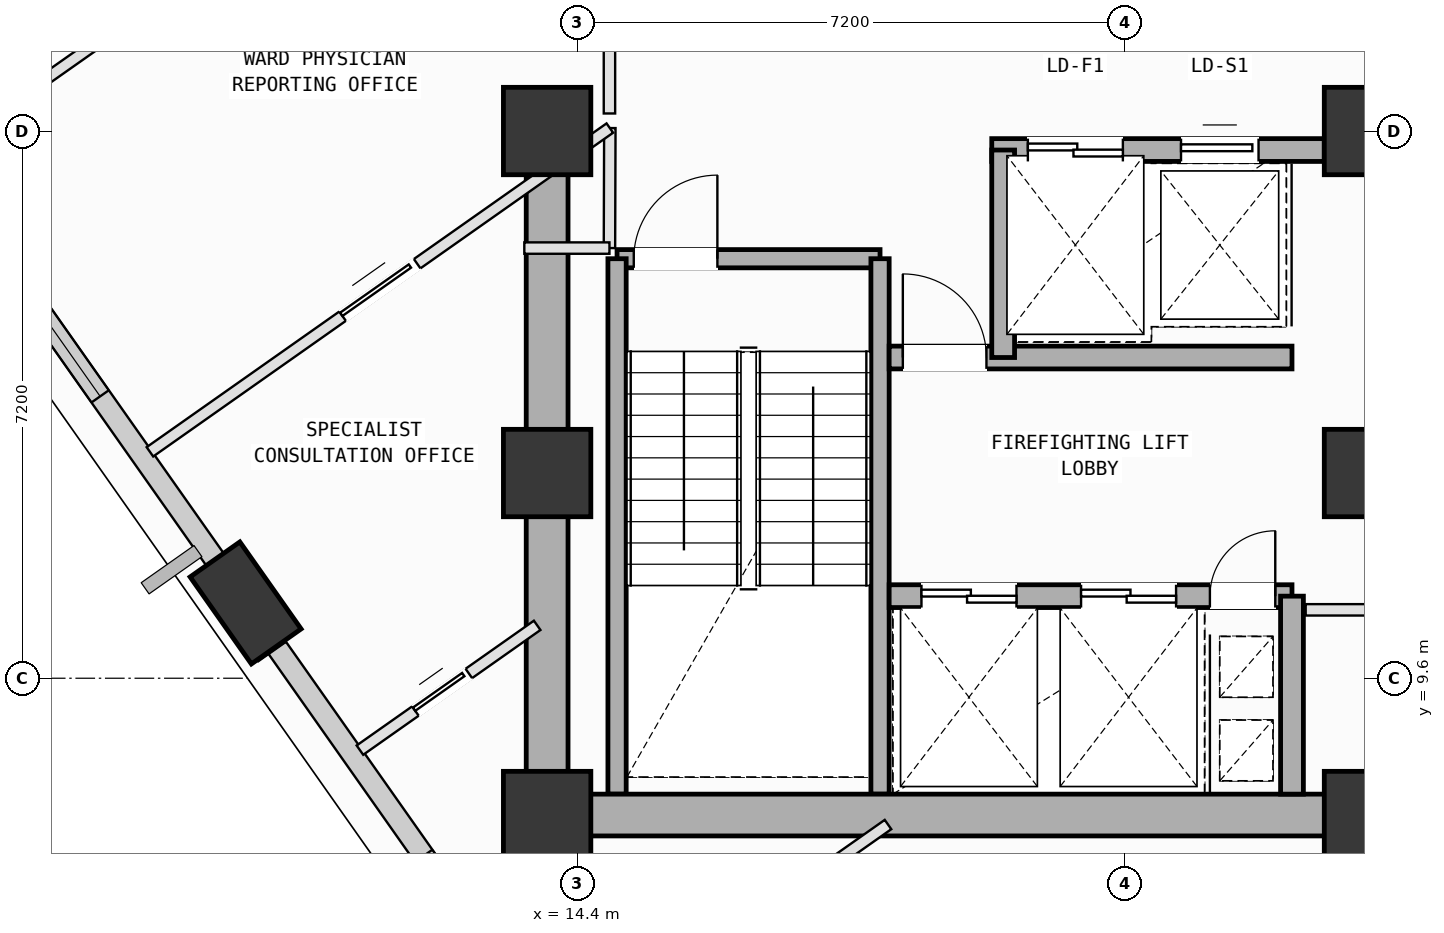
"""IFC4 building model, lengths in metres.
Left out: names, types, materials, properties, quantities, classifications, styles, units other than length and angle.
Written with IfcOpenShell. Run it as: python <this file> out.ifc"""

import sys

from ifc_helpers import new_model, si_unit, direction, frame, frame_2d, origin, origin_2d, place, context, subcontext, project, spatial, rectangle, extrude, element, fill, save


model = new_model("IFC4")
c1 = context("Model", 3, precision=1e-05, world=origin(), true_north=direction((0.0, 1.0)))
c2 = subcontext(c1, "Body", "Model", "MODEL_VIEW")
j1 = project(units=[si_unit("LENGTHUNIT", "METRE"), si_unit("PLANEANGLEUNIT", "RADIAN")], contexts=[c1])
p1 = place(None, origin())
s1 = spatial("IfcSite", under=j1, at=p1, CompositionType="ELEMENT")
p2 = place(p1, origin())
s2 = spatial("IfcBuilding", under=s1, at=p2, CompositionType="ELEMENT")
p3 = place(p2, frame((0.0, 0.0, 173.8)))
s3 = spatial("IfcBuildingStorey", under=s2, at=p3, CompositionType="ELEMENT", Elevation=173.8)
for number, where, z_axis, x_axis in (
    (1, (14.0, 7.8, 0.0), (0.0, 0.0, 1.0), (1.0, 0.0, 0.0)),
    (2, (14.0, 12.3, 0.0), (0.0, 0.0, 1.0), (1.0, 0.0, 0.0)),
    (3, (14.0, 16.8, 0.0), (0.0, 0.0, 1.0), (1.0, 0.0, 0.0)),
    (4, (24.8, 7.8, 0.0), (0.0, 0.0, 1.0), (1.0, 0.0, 0.0)),
    (5, (24.8, 12.3, 0.0), (0.0, 0.0, 1.0), (1.0, 0.0, 0.0)),
    (6, (24.8, 16.8, 0.0), (0.0, 0.0, 1.0), (1.0, 0.0, 0.0)),
):
    element("IfcColumn", number, at=place(p3, frame(where, z_axis=z_axis, x_axis=x_axis)), inside=s3, PredefinedType="COLUMN", context=c2, shape_type="SweptSolid", body=[
        extrude(rectangle(XDim=1.15, YDim=1.15, at=origin_2d()), origin(), (0.0, 0.0, 1.0), 4.0),
    ])
p4 = place(p3, frame((10.033, 10.591, 0.002), z_axis=(0.059361981689, -0.096569440559, 0.993554476755), x_axis=(-0.915889100043, 0.390585013166, 0.092684971335)))
e7 = element("IfcColumn", 7, at=p4, inside=s3, PredefinedType="COLUMN", context=c2, shape_type="SweptSolid", body=[
    extrude(rectangle(XDim=1.4, YDim=0.8, at=origin_2d()), origin(), (0.0, 0.0, 1.0), 4.022),
])
p5 = place(p3, frame((9.878, 10.81, 0.0), z_axis=(0.0, 0.0, 1.0), x_axis=(-0.575714474807, 0.817650807801, 0.0)))
e8 = element("IfcWall", 8, at=p5, inside=s3, PredefinedType="SOLIDWALL", context=c2, shape_type="SweptSolid", body=[
    extrude(rectangle(XDim=5.662, YDim=0.28, at=frame_2d((2.831, 0.0))), origin(), (0.0, 0.0, 1.0), 3.265),
])
p6 = place(p5, frame((3.056, 0.0, 0.75)))
e9 = element("IfcOpeningElement", 9, at=p6, cuts=e8, PredefinedType="OPENING", context=c2, shape_type="SweptSolid", body=[
    extrude(rectangle(XDim=2.0, YDim=1.95, at=frame_2d((1.0, 0.975))), frame((0.0, 0.15, 0.0), z_axis=(0.0, -1.0, 0.0), x_axis=(1.0, 0.0, 0.0)), (0.0, 0.0, 1.0), 0.3),
])
p7 = place(p3, frame((14.687, 3.981, 0.0), z_axis=(0.0, 0.0, 1.0), x_axis=(-0.575708660285, 0.817654901822, 0.0)))
e10 = element("IfcWall", 10, at=p7, inside=s3, PredefinedType="SOLIDWALL", context=c2, shape_type="SweptSolid", body=[
    extrude(rectangle(XDim=7.36, YDim=0.28, at=frame_2d((3.68, 0.0))), origin(), (0.0, 0.0, 1.0), 3.065),
])
p8 = place(p7, frame((2.614, 0.0, 0.75)))
e11 = element("IfcOpeningElement", 11, at=p8, cuts=e10, PredefinedType="OPENING", context=c2, shape_type="SweptSolid", body=[
    extrude(rectangle(XDim=1.4, YDim=1.85, at=frame_2d((0.7, 0.925))), frame((0.0, 0.15, 0.0), z_axis=(0.0, -1.0, 0.0), x_axis=(1.0, 0.0, 0.0)), (0.0, 0.0, 1.0), 0.3),
])
p9 = place(p3, frame((14.92, 15.12, 0.0), z_axis=(0.0, 0.0, 1.0), x_axis=(1.0, 0.0, 0.0)))
e12 = element("IfcWall", 12, at=p9, inside=s3, PredefinedType="SOLIDWALL", context=c2, shape_type="SweptSolid", body=[
    extrude(rectangle(XDim=3.46, YDim=0.24, at=frame_2d((1.73, 0.0))), origin(), (0.0, 0.0, 1.0), 3.78),
])
p10 = place(p9, frame((0.22, 0.0, 0.0)))
e13 = element("IfcOpeningElement", 13, at=p10, cuts=e12, PredefinedType="OPENING", context=c2, shape_type="SweptSolid", body=[
    extrude(rectangle(XDim=1.1, YDim=2.15, at=frame_2d((0.55, 1.075))), frame((0.0, 0.13, 0.0), z_axis=(0.0, -1.0, 0.0), x_axis=(1.0, 0.0, 0.0)), (0.0, 0.0, 1.0), 0.26),
])
for number, where, z_axis, x_axis in (
    (14, (18.38, 15.12, 0.0), (0.0, 0.0, 1.0), (0.0, -1.0, 0.0)),
    (15, (14.92, 8.075, 0.0), (0.0, 0.0, 1.0), (0.0, 1.0, 0.0)),
):
    element("IfcWall", number, at=place(p3, frame(where, z_axis=z_axis, x_axis=x_axis)), inside=s3, PredefinedType="SOLIDWALL", context=c2, shape_type="SweptSolid", body=[
        extrude(rectangle(XDim=7.045, YDim=0.24, at=frame_2d((3.522, 0.0))), origin(), (0.0, 0.0, 1.0), 3.78),
    ])
p11 = place(p3, frame((14.0, 7.8, 0.0), z_axis=(0.0, 0.0, 1.0), x_axis=(1.0, 0.0, 0.0)))
e16 = element("IfcWall", 16, at=p11, inside=s3, PredefinedType="SHEAR", context=c2, shape_type="SweptSolid", body=[
    extrude(rectangle(XDim=10.8, YDim=0.55, at=frame_2d((5.4, 0.0))), origin(), (0.0, 0.0, 1.0), 3.78),
])
p12 = place(p3, frame((14.0, 16.8, 0.0), z_axis=(0.0, 0.0, 1.0), x_axis=(0.0, -1.0, 0.0)))
e17 = element("IfcWall", 17, at=p12, inside=s3, PredefinedType="SHEAR", context=c2, shape_type="SweptSolid", body=[
    extrude(rectangle(XDim=9.0, YDim=0.55, at=frame_2d((4.5, 0.0))), origin(), (0.0, 0.0, 1.0), 3.78),
])
p13 = place(p3, frame((19.85, 16.55, 0.0), z_axis=(0.0, 0.0, 1.0), x_axis=(1.0, 0.0, 0.0)))
e18 = element("IfcWall", 18, at=p13, inside=s3, PredefinedType="SOLIDWALL", context=c2, shape_type="SweptSolid", body=[
    extrude(rectangle(XDim=4.375, YDim=0.3, at=frame_2d((2.188, 0.0))), origin(), (0.0, 0.0, 1.0), 3.78),
])
p14 = place(p13, frame((0.475, 0.0, 0.0)))
e19 = element("IfcOpeningElement", 19, at=p14, cuts=e18, PredefinedType="OPENING", context=c2, shape_type="SweptSolid", body=[
    extrude(rectangle(XDim=1.25, YDim=2.18, at=frame_2d((0.625, 1.09))), frame((0.0, 0.16, 0.0), z_axis=(0.0, -1.0, 0.0), x_axis=(1.0, 0.0, 0.0)), (0.0, 0.0, 1.0), 0.32),
])
p15 = place(p13, frame((2.49, 0.0, 0.0)))
e20 = element("IfcOpeningElement", 20, at=p15, cuts=e18, PredefinedType="OPENING", context=c2, shape_type="SweptSolid", body=[
    extrude(rectangle(XDim=1.02, YDim=2.12, at=frame_2d((0.51, 1.06))), frame((0.0, 0.16, 0.0), z_axis=(0.0, -1.0, 0.0), x_axis=(1.0, 0.0, 0.0)), (0.0, 0.0, 1.0), 0.32),
])
p16 = place(p3, frame((18.5, 10.68, 0.0), z_axis=(0.0, 0.0, 1.0), x_axis=(1.0, 0.0, 0.0)))
e21 = element("IfcWall", 21, at=p16, inside=s3, PredefinedType="SOLIDWALL", context=c2, shape_type="SweptSolid", body=[
    extrude(rectangle(XDim=5.3, YDim=0.3, at=frame_2d((2.65, 0.0))), origin(), (0.0, 0.0, 1.0), 3.78),
])
p17 = place(p16, frame((4.22, 0.0, 0.0)))
e22 = element("IfcOpeningElement", 22, at=p17, cuts=e21, PredefinedType="OPENING", context=c2, shape_type="SweptSolid", body=[
    extrude(rectangle(XDim=0.86, YDim=2.06, at=frame_2d((0.43, 1.03))), frame((0.0, 0.16, 0.0), z_axis=(0.0, -1.0, 0.0), x_axis=(1.0, 0.0, 0.0)), (0.0, 0.0, 1.0), 0.32),
])
p18 = place(p16, frame((0.425, 0.0, 0.0)))
e23 = element("IfcOpeningElement", 23, at=p18, cuts=e21, PredefinedType="OPENING", context=c2, shape_type="SweptSolid", body=[
    extrude(rectangle(XDim=1.25, YDim=2.18, at=frame_2d((0.625, 1.09))), frame((0.0, 0.16, 0.0), z_axis=(0.0, -1.0, 0.0), x_axis=(1.0, 0.0, 0.0)), (0.0, 0.0, 1.0), 0.32),
])
p19 = place(p16, frame((2.525, 0.0, 0.0)))
e24 = element("IfcOpeningElement", 24, at=p19, cuts=e21, PredefinedType="OPENING", context=c2, shape_type="SweptSolid", body=[
    extrude(rectangle(XDim=1.25, YDim=2.18, at=frame_2d((0.625, 1.09))), frame((0.0, 0.16, 0.0), z_axis=(0.0, -1.0, 0.0), x_axis=(1.0, 0.0, 0.0)), (0.0, 0.0, 1.0), 0.32),
])
p20 = place(p3, frame((18.5, 13.82, 0.0), z_axis=(0.0, 0.0, 1.0), x_axis=(1.0, 0.0, 0.0)))
e25 = element("IfcWall", 25, at=p20, inside=s3, PredefinedType="SOLIDWALL", context=c2, shape_type="SweptSolid", body=[
    extrude(rectangle(XDim=5.3, YDim=0.3, at=frame_2d((2.65, 0.0))), origin(), (0.0, 0.0, 1.0), 3.78),
])
p21 = place(p20, frame((0.18, 0.0, 0.0)))
e26 = element("IfcOpeningElement", 26, at=p21, cuts=e25, PredefinedType="OPENING", context=c2, shape_type="SweptSolid", body=[
    extrude(rectangle(XDim=1.1, YDim=2.15, at=frame_2d((0.55, 1.075))), frame((0.0, 0.16, 0.0), z_axis=(0.0, -1.0, 0.0), x_axis=(1.0, 0.0, 0.0)), (0.0, 0.0, 1.0), 0.32),
])
p22 = place(p3, frame((23.8, 8.075, 0.0), z_axis=(0.0, 0.0, 1.0), x_axis=(0.0, 1.0, 0.0)))
e27 = element("IfcWall", 27, at=p22, inside=s3, PredefinedType="SOLIDWALL", context=c2, shape_type="SweptSolid", body=[
    extrude(rectangle(XDim=2.605, YDim=0.3, at=frame_2d((1.302, 0.0))), origin(), (0.0, 0.0, 1.0), 3.78),
])
p23 = place(p3, frame((20.0, 13.82, 0.0), z_axis=(0.0, 0.0, 1.0), x_axis=(0.0, 1.0, 0.0)))
e28 = element("IfcWall", 28, at=p23, inside=s3, PredefinedType="SOLIDWALL", context=c2, shape_type="SweptSolid", body=[
    extrude(rectangle(XDim=2.73, YDim=0.3, at=frame_2d((1.365, 0.0))), origin(), (0.0, 0.0, 1.0), 3.78),
])
p24 = place(p3, frame((23.98, 10.5, 0.0), z_axis=(0.0, 0.0, 1.0), x_axis=(1.0, 0.0, 0.0)))
e29 = element("IfcWall", 29, at=p24, inside=s3, PredefinedType="PARTITIONING", context=c2, shape_type="SweptSolid", body=[
    extrude(rectangle(XDim=5.4, YDim=0.15, at=frame_2d((2.7, 0.0))), origin(), (0.0, 0.0, 1.0), 3.78),
])
p25 = place(p24, frame((3.703, 0.0, 0.0)))
e30 = element("IfcOpeningElement", 30, at=p25, cuts=e29, PredefinedType="OPENING", context=c2, shape_type="SweptSolid", body=[
    extrude(rectangle(XDim=0.86, YDim=2.06, at=frame_2d((0.43, 1.03))), frame((0.0, 0.085, 0.0), z_axis=(0.0, -1.0, 0.0), x_axis=(1.0, 0.0, 0.0)), (0.0, 0.0, 1.0), 0.17),
])
p26 = place(p3, frame((24.101, 5.636, 0.0), z_axis=(0.0, 0.0, 1.0), x_axis=(0.817472101836, 0.575968195928, 0.0)))
e31 = element("IfcWall", 31, at=p26, inside=s3, PredefinedType="PARTITIONING", context=c2, shape_type="SweptSolid", body=[
    extrude(rectangle(XDim=3.54, YDim=0.15, at=frame_2d((1.77, 0.0))), origin(), (0.0, 0.0, 1.0), 3.78),
])
p27 = place(p3, frame((14.301, 4.729, 0.0), z_axis=(0.0, 0.0, 1.0), x_axis=(0.81765087294, 0.575714382295, 0.0)))
e32 = element("IfcWall", 32, at=p27, inside=s3, PredefinedType="PARTITIONING", context=c2, shape_type="SweptSolid", body=[
    extrude(rectangle(XDim=5.117, YDim=0.15, at=frame_2d((2.559, 0.0))), origin(), (0.0, 0.0, 1.0), 3.78),
])
p28 = place(p27, frame((1.976, 0.0, 0.0)))
e33 = element("IfcOpeningElement", 33, at=p28, cuts=e32, PredefinedType="OPENING", context=c2, shape_type="SweptSolid", body=[
    extrude(rectangle(XDim=0.86, YDim=2.06, at=frame_2d((0.43, 1.03))), frame((0.0, 0.085, 0.0), z_axis=(0.0, -1.0, 0.0), x_axis=(1.0, 0.0, 0.0)), (0.0, 0.0, 1.0), 0.17),
])
p29 = place(p3, frame((26.545, 7.675, 0.0), z_axis=(0.0, 0.0, 1.0), x_axis=(-0.817707532324, -0.575633904127, 0.0)))
e34 = element("IfcWall", 34, at=p29, inside=s3, PredefinedType="PARTITIONING", context=c2, shape_type="SweptSolid", body=[
    extrude(rectangle(XDim=11.707, YDim=0.15, at=frame_2d((5.854, 0.0))), origin(), (0.0, 0.0, 1.0), 3.78),
])
p30 = place(p3, frame((11.537, 8.654, 0.0), z_axis=(0.0, 0.0, 1.0), x_axis=(0.817648208758, 0.575718166045, 0.0)))
e35 = element("IfcWall", 35, at=p30, inside=s3, PredefinedType="PARTITIONING", context=c2, shape_type="SweptSolid", body=[
    extrude(rectangle(XDim=2.852, YDim=0.15, at=frame_2d((1.426, 0.0))), origin(), (0.0, 0.0, 1.0), 3.78),
])
p31 = place(p30, frame((0.893, 0.0, 0.0)))
e36 = element("IfcOpeningElement", 36, at=p31, cuts=e35, PredefinedType="OPENING", context=c2, shape_type="SweptSolid", body=[
    extrude(rectangle(XDim=0.86, YDim=2.06, at=frame_2d((0.43, 1.03))), frame((0.0, 0.085, 0.0), z_axis=(0.0, -1.0, 0.0), x_axis=(1.0, 0.0, 0.0)), (0.0, 0.0, 1.0), 0.17),
])
p32 = place(p3, frame((14.825, 16.839, 0.0), z_axis=(0.0, 0.0, 1.0), x_axis=(-0.003092131167, -0.999995219351, 0.0)))
e37 = element("IfcWall", 37, at=p32, inside=s3, PredefinedType="PARTITIONING", context=c2, shape_type="SweptSolid", body=[
    extrude(rectangle(XDim=1.579, YDim=0.15, at=frame_2d((0.79, 0.0))), origin(), (0.0, 0.0, 1.0), 3.78),
])
p33 = place(p3, frame((14.82, 15.26, 0.0), z_axis=(0.0, 0.0, 1.0), x_axis=(-1.0, 0.0, 0.0)))
e38 = element("IfcWall", 38, at=p33, inside=s3, PredefinedType="PARTITIONING", context=c2, shape_type="SweptSolid", body=[
    extrude(rectangle(XDim=1.12, YDim=0.15, at=frame_2d((0.56, 0.0))), origin(), (0.0, 0.0, 1.0), 3.78),
])
p34 = place(p3, frame((10.261, 9.867, 0.0), z_axis=(0.0, 0.0, 1.0), x_axis=(-0.575706777747, 0.817656227309, 0.0)))
e39 = element("IfcWall", 39, at=p34, inside=s3, PredefinedType="PARTITIONING", context=c2, shape_type="SweptSolid", body=[
    extrude(rectangle(XDim=0.992, YDim=0.15, at=frame_2d((0.496, 0.0))), origin(), (0.0, 0.0, 1.0), 3.265),
])
p35 = place(p3, frame((8.774, 12.579, 0.0), z_axis=(0.0, 0.0, 1.0), x_axis=(0.817686785851, 0.575663374069, 0.0)))
e40 = element("IfcWall", 40, at=p35, inside=s3, PredefinedType="PARTITIONING", context=c2, shape_type="SweptSolid", body=[
    extrude(rectangle(XDim=7.4, YDim=0.15, at=frame_2d((3.7, 0.0))), origin(), (0.0, 0.0, 1.0), 3.78),
])
p36 = place(p35, frame((3.1, 0.0, 0.0)))
e41 = element("IfcOpeningElement", 41, at=p36, cuts=e40, PredefinedType="OPENING", context=c2, shape_type="SweptSolid", body=[
    extrude(rectangle(XDim=1.2, YDim=2.15, at=frame_2d((0.6, 1.075))), frame((0.0, 0.085, 0.0), z_axis=(0.0, -1.0, 0.0), x_axis=(1.0, 0.0, 0.0)), (0.0, 0.0, 1.0), 0.17),
])
p37 = place(p3, frame((14.82, 18.203, 0.0), z_axis=(0.0, 0.0, 1.0), x_axis=(0.0, -1.0, 0.0)))
e42 = element("IfcWall", 42, at=p37, inside=s3, PredefinedType="PARTITIONING", context=c2, shape_type="SweptSolid", body=[
    extrude(rectangle(XDim=1.172, YDim=0.15, at=frame_2d((0.586, 0.0))), origin(), (0.0, 0.0, 1.0), 3.78),
])
p38 = place(p3, frame((6.01, 16.504, 0.0), z_axis=(0.0, 0.0, 1.0), x_axis=(0.817682801661, 0.575669033272, 0.0)))
e43 = element("IfcWall", 43, at=p38, inside=s3, PredefinedType="PARTITIONING", context=c2, shape_type="SweptSolid", body=[
    extrude(rectangle(XDim=13.635, YDim=0.15, at=frame_2d((6.817, 0.0))), origin(), (0.0, 0.0, 1.0), 3.78),
])
p39 = place(p6, origin())
e44 = element("IfcWindow", 44, at=p39, inside=s3, PartitioningType="SINGLE_PANEL", PredefinedType="WINDOW", context=c2, shape_type="SweptSolid", body=[
    extrude(rectangle(XDim=2.0, YDim=1.95, at=frame_2d((1.0, 0.975))), frame((0.0, 0.03, 0.0), z_axis=(0.0, -1.0, 0.0), x_axis=(1.0, 0.0, 0.0)), (0.0, 0.0, 1.0), 0.06),
])
fill(e9, e44)
p40 = place(p10, origin())
e45 = element("IfcDoor", 45, at=p40, inside=s3, OperationType="SINGLE_SWING_RIGHT", PredefinedType="DOOR", context=c2, shape_type="SweptSolid", body=[
    extrude(rectangle(XDim=1.1, YDim=2.15, at=frame_2d((0.55, 1.075))), frame((0.0, 0.025, 0.0), z_axis=(0.0, -1.0, 0.0), x_axis=(1.0, 0.0, 0.0)), (0.0, 0.0, 1.0), 0.05),
])
fill(e13, e45)
p41 = place(p17, origin())
e46 = element("IfcDoor", 46, at=p41, inside=s3, OperationType="SINGLE_SWING_RIGHT", PredefinedType="DOOR", context=c2, shape_type="SweptSolid", body=[
    extrude(rectangle(XDim=0.86, YDim=2.06, at=frame_2d((0.43, 1.03))), frame((0.0, 0.025, 0.0), z_axis=(0.0, -1.0, 0.0), x_axis=(1.0, 0.0, 0.0)), (0.0, 0.0, 1.0), 0.05),
])
fill(e22, e46)
p42 = place(p21, origin())
e47 = element("IfcDoor", 47, at=p42, inside=s3, OperationType="SINGLE_SWING_LEFT", PredefinedType="DOOR", context=c2, shape_type="SweptSolid", body=[
    extrude(rectangle(XDim=1.1, YDim=2.15, at=frame_2d((0.55, 1.075))), frame((0.0, 0.025, 0.0), z_axis=(0.0, -1.0, 0.0), x_axis=(1.0, 0.0, 0.0)), (0.0, 0.0, 1.0), 0.05),
])
fill(e26, e47)
p43 = place(p18, origin())
e48 = element("IfcDoor", 48, at=p43, inside=s3, OperationType="DOUBLE_DOOR_SLIDING", PredefinedType="DOOR", context=c2, shape_type="SweptSolid", body=[
    extrude(rectangle(XDim=1.25, YDim=2.18, at=frame_2d((0.625, 1.09))), frame((0.0, 0.025, 0.0), z_axis=(0.0, -1.0, 0.0), x_axis=(1.0, 0.0, 0.0)), (0.0, 0.0, 1.0), 0.05),
])
fill(e23, e48)
p44 = place(p19, origin())
e49 = element("IfcDoor", 49, at=p44, inside=s3, OperationType="DOUBLE_DOOR_SLIDING", PredefinedType="DOOR", context=c2, shape_type="SweptSolid", body=[
    extrude(rectangle(XDim=1.25, YDim=2.18, at=frame_2d((0.625, 1.09))), frame((0.0, 0.025, 0.0), z_axis=(0.0, -1.0, 0.0), x_axis=(1.0, 0.0, 0.0)), (0.0, 0.0, 1.0), 0.05),
])
fill(e24, e49)
p45 = place(p14, origin())
e50 = element("IfcDoor", 50, at=p45, inside=s3, OperationType="DOUBLE_DOOR_SLIDING", PredefinedType="DOOR", context=c2, shape_type="SweptSolid", body=[
    extrude(rectangle(XDim=1.25, YDim=2.18, at=frame_2d((0.625, 1.09))), frame((0.0, 0.025, 0.0), z_axis=(0.0, -1.0, 0.0), x_axis=(1.0, 0.0, 0.0)), (0.0, 0.0, 1.0), 0.05),
])
fill(e19, e50)
p46 = place(p15, origin())
e51 = element("IfcDoor", 51, at=p46, inside=s3, OperationType="SLIDING_TO_LEFT", PredefinedType="DOOR", context=c2, shape_type="SweptSolid", body=[
    extrude(rectangle(XDim=1.02, YDim=2.12, at=frame_2d((0.51, 1.06))), frame((0.0, 0.025, 0.0), z_axis=(0.0, -1.0, 0.0), x_axis=(1.0, 0.0, 0.0)), (0.0, 0.0, 1.0), 0.05),
])
fill(e20, e51)
p47 = place(p36, origin())
e52 = element("IfcDoor", 52, at=p47, inside=s3, OperationType="SLIDING_TO_LEFT", PredefinedType="DOOR", context=c2, shape_type="SweptSolid", body=[
    extrude(rectangle(XDim=1.2, YDim=2.15, at=frame_2d((0.6, 1.075))), frame((0.0, 0.025, 0.0), z_axis=(0.0, -1.0, 0.0), x_axis=(1.0, 0.0, 0.0)), (0.0, 0.0, 1.0), 0.05),
])
fill(e41, e52)
p48 = place(p31, origin())
e53 = element("IfcDoor", 53, at=p48, inside=s3, OperationType="SLIDING_TO_LEFT", PredefinedType="DOOR", context=c2, shape_type="SweptSolid", body=[
    extrude(rectangle(XDim=0.86, YDim=2.06, at=frame_2d((0.43, 1.03))), frame((0.0, 0.025, 0.0), z_axis=(0.0, -1.0, 0.0), x_axis=(1.0, 0.0, 0.0)), (0.0, 0.0, 1.0), 0.05),
])
fill(e36, e53)
save(model, sys.argv[1])
